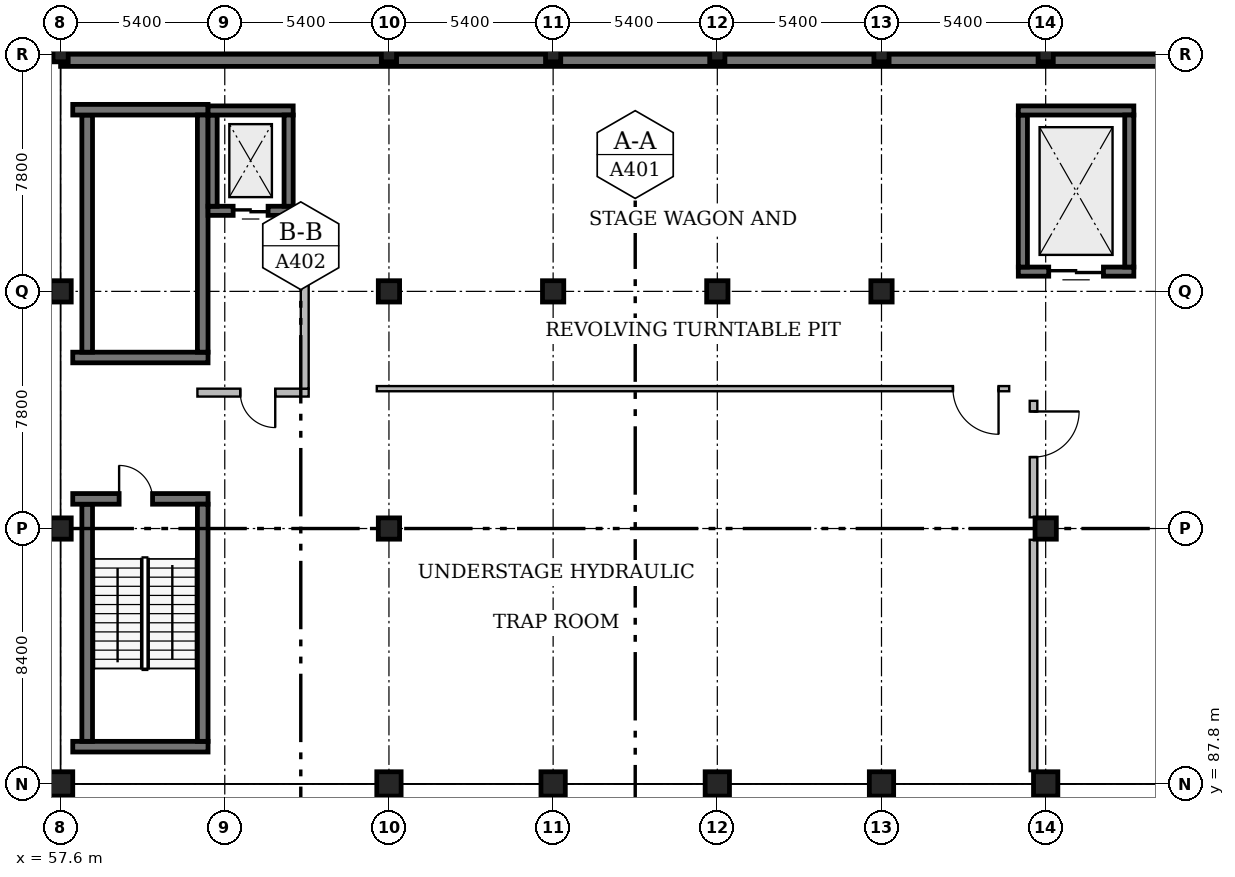
"""IFC4 building model, lengths in metres.
Left out: names, types, materials, properties, quantities, classifications, styles, units other than length and angle.
Written with IfcOpenShell. Run it as: python <this file> out.ifc"""

import sys

from ifc_helpers import new_model, si_unit, direction, frame, frame_2d, origin, origin_2d, place, context, subcontext, project, spatial, rectangle, extrude, element, fill, save


model = new_model("IFC4")
c1 = context("Model", 3, precision=1e-05, world=origin(), true_north=direction((0.0, 1.0)))
c2 = subcontext(c1, "Body", "Model", "MODEL_VIEW")
j1 = project(units=[si_unit("LENGTHUNIT", "METRE"), si_unit("PLANEANGLEUNIT", "RADIAN")], contexts=[c1])
p1 = place(None, origin())
s1 = spatial("IfcSite", under=j1, at=p1, CompositionType="ELEMENT")
p2 = place(p1, origin())
s2 = spatial("IfcBuilding", under=s1, at=p2, CompositionType="ELEMENT")
p3 = place(p2, frame((0.0, 0.0, -4.8)))
s3 = spatial("IfcBuildingStorey", under=s2, at=p3, CompositionType="ELEMENT", Elevation=-4.8)
p4 = place(p3, frame((68.4, 87.8, 0.0), z_axis=(0.0, 0.0, 1.0), x_axis=(1.0, 0.0, 0.0)))
e1 = element("IfcColumn", 1, at=p4, inside=s3, PredefinedType="COLUMN", context=c2, shape_type="SweptSolid", body=[
    extrude(rectangle(XDim=0.8, YDim=0.8, at=origin_2d()), origin(), (0.0, 0.0, 1.0), 4.8),
])
for number, where, z_axis, x_axis in (
    (2, (68.4, 96.2, 0.0), (0.0, 0.0, 1.0), (1.0, 0.0, 0.0)),
    (3, (68.4, 104.0, 0.0), (0.0, 0.0, 1.0), (1.0, 0.0, 0.0)),
):
    element("IfcColumn", number, at=place(p3, frame(where, z_axis=z_axis, x_axis=x_axis)), inside=s3, PredefinedType="COLUMN", context=c2, shape_type="SweptSolid", body=[
        extrude(rectangle(XDim=0.7, YDim=0.7, at=origin_2d()), origin(), (0.0, 0.0, 1.0), 4.8),
    ])
p5 = place(p3, frame((68.4, 111.8, 0.0), z_axis=(0.0, 0.0, 1.0), x_axis=(1.0, 0.0, 0.0)))
e4 = element("IfcColumn", 4, at=p5, inside=s3, PredefinedType="COLUMN", context=c2, shape_type="SweptSolid", body=[
    extrude(rectangle(XDim=0.5, YDim=0.5, at=origin_2d()), origin(), (0.0, 0.0, 1.0), 4.8),
])
p6 = place(p3, frame((73.8, 87.8, 0.0), z_axis=(0.0, 0.0, 1.0), x_axis=(1.0, 0.0, 0.0)))
e5 = element("IfcColumn", 5, at=p6, inside=s3, PredefinedType="COLUMN", context=c2, shape_type="SweptSolid", body=[
    extrude(rectangle(XDim=0.8, YDim=0.8, at=origin_2d()), origin(), (0.0, 0.0, 1.0), 4.8),
])
p7 = place(p3, frame((73.8, 104.0, 0.0), z_axis=(0.0, 0.0, 1.0), x_axis=(1.0, 0.0, 0.0)))
e6 = element("IfcColumn", 6, at=p7, inside=s3, PredefinedType="COLUMN", context=c2, shape_type="SweptSolid", body=[
    extrude(rectangle(XDim=0.7, YDim=0.7, at=origin_2d()), origin(), (0.0, 0.0, 1.0), 4.8),
])
p8 = place(p3, frame((73.8, 111.8, 0.0), z_axis=(0.0, 0.0, 1.0), x_axis=(1.0, 0.0, 0.0)))
e7 = element("IfcColumn", 7, at=p8, inside=s3, PredefinedType="COLUMN", context=c2, shape_type="SweptSolid", body=[
    extrude(rectangle(XDim=0.5, YDim=0.5, at=origin_2d()), origin(), (0.0, 0.0, 1.0), 4.8),
])
p9 = place(p3, frame((79.2, 87.8, 0.0), z_axis=(0.0, 0.0, 1.0), x_axis=(1.0, 0.0, 0.0)))
e8 = element("IfcColumn", 8, at=p9, inside=s3, PredefinedType="COLUMN", context=c2, shape_type="SweptSolid", body=[
    extrude(rectangle(XDim=0.8, YDim=0.8, at=origin_2d()), origin(), (0.0, 0.0, 1.0), 4.8),
])
p10 = place(p3, frame((79.2, 104.0, 0.0), z_axis=(0.0, 0.0, 1.0), x_axis=(1.0, 0.0, 0.0)))
e9 = element("IfcColumn", 9, at=p10, inside=s3, PredefinedType="COLUMN", context=c2, shape_type="SweptSolid", body=[
    extrude(rectangle(XDim=0.7, YDim=0.7, at=origin_2d()), origin(), (0.0, 0.0, 1.0), 4.8),
])
p11 = place(p3, frame((79.2, 111.8, 0.0), z_axis=(0.0, 0.0, 1.0), x_axis=(1.0, 0.0, 0.0)))
e10 = element("IfcColumn", 10, at=p11, inside=s3, PredefinedType="COLUMN", context=c2, shape_type="SweptSolid", body=[
    extrude(rectangle(XDim=0.5, YDim=0.5, at=origin_2d()), origin(), (0.0, 0.0, 1.0), 4.8),
])
p12 = place(p3, frame((84.6, 87.8, 0.0), z_axis=(0.0, 0.0, 1.0), x_axis=(1.0, 0.0, 0.0)))
e11 = element("IfcColumn", 11, at=p12, inside=s3, PredefinedType="COLUMN", context=c2, shape_type="SweptSolid", body=[
    extrude(rectangle(XDim=0.8, YDim=0.8, at=origin_2d()), origin(), (0.0, 0.0, 1.0), 4.8),
])
p13 = place(p3, frame((84.6, 104.0, 0.0), z_axis=(0.0, 0.0, 1.0), x_axis=(1.0, 0.0, 0.0)))
e12 = element("IfcColumn", 12, at=p13, inside=s3, PredefinedType="COLUMN", context=c2, shape_type="SweptSolid", body=[
    extrude(rectangle(XDim=0.7, YDim=0.7, at=origin_2d()), origin(), (0.0, 0.0, 1.0), 4.8),
])
p14 = place(p3, frame((84.6, 111.8, 0.0), z_axis=(0.0, 0.0, 1.0), x_axis=(1.0, 0.0, 0.0)))
e13 = element("IfcColumn", 13, at=p14, inside=s3, PredefinedType="COLUMN", context=c2, shape_type="SweptSolid", body=[
    extrude(rectangle(XDim=0.5, YDim=0.5, at=origin_2d()), origin(), (0.0, 0.0, 1.0), 4.8),
])
p15 = place(p3, frame((90.0, 87.8, 0.0), z_axis=(0.0, 0.0, 1.0), x_axis=(1.0, 0.0, 0.0)))
e14 = element("IfcColumn", 14, at=p15, inside=s3, PredefinedType="COLUMN", context=c2, shape_type="SweptSolid", body=[
    extrude(rectangle(XDim=0.8, YDim=0.8, at=origin_2d()), origin(), (0.0, 0.0, 1.0), 4.8),
])
p16 = place(p3, frame((90.0, 96.2, 0.0), z_axis=(0.0, 0.0, 1.0), x_axis=(1.0, 0.0, 0.0)))
e15 = element("IfcColumn", 15, at=p16, inside=s3, PredefinedType="COLUMN", context=c2, shape_type="SweptSolid", body=[
    extrude(rectangle(XDim=0.7, YDim=0.7, at=origin_2d()), origin(), (0.0, 0.0, 1.0), 4.8),
])
p17 = place(p3, frame((90.0, 111.8, 0.0), z_axis=(0.0, 0.0, 1.0), x_axis=(1.0, 0.0, 0.0)))
e16 = element("IfcColumn", 16, at=p17, inside=s3, PredefinedType="COLUMN", context=c2, shape_type="SweptSolid", body=[
    extrude(rectangle(XDim=0.5, YDim=0.5, at=origin_2d()), origin(), (0.0, 0.0, 1.0), 4.8),
])
p18 = place(p3, frame((57.6, 87.8, 0.0), z_axis=(0.0, 0.0, 1.0), x_axis=(1.0, 0.0, 0.0)))
e17 = element("IfcColumn", 17, at=p18, inside=s3, PredefinedType="COLUMN", context=c2, shape_type="SweptSolid", body=[
    extrude(rectangle(XDim=0.8, YDim=0.8, at=origin_2d()), origin(), (0.0, 0.0, 1.0), 4.8),
])
for number, where, z_axis, x_axis in (
    (18, (57.6, 96.2, 0.0), (0.0, 0.0, 1.0), (1.0, 0.0, 0.0)),
    (19, (57.6, 104.0, 0.0), (0.0, 0.0, 1.0), (1.0, 0.0, 0.0)),
):
    element("IfcColumn", number, at=place(p3, frame(where, z_axis=z_axis, x_axis=x_axis)), inside=s3, PredefinedType="COLUMN", context=c2, shape_type="SweptSolid", body=[
        extrude(rectangle(XDim=0.7, YDim=0.7, at=origin_2d()), origin(), (0.0, 0.0, 1.0), 4.8),
    ])
p19 = place(p3, frame((57.6, 111.8, 0.0), z_axis=(0.0, 0.0, 1.0), x_axis=(1.0, 0.0, 0.0)))
e20 = element("IfcColumn", 20, at=p19, inside=s3, PredefinedType="COLUMN", context=c2, shape_type="SweptSolid", body=[
    extrude(rectangle(XDim=0.5, YDim=0.5, at=origin_2d()), origin(), (0.0, 0.0, 1.0), 4.8),
])
p20 = place(p3, frame((62.45, 101.825, 0.0), z_axis=(0.0, 0.0, 1.0), x_axis=(-1.0, 0.0, 0.0)))
e21 = element("IfcWall", 21, at=p20, inside=s3, PredefinedType="SOLIDWALL", context=c2, shape_type="SweptSolid", body=[
    extrude(rectangle(XDim=4.45, YDim=0.35, at=frame_2d((2.225, 0.0))), origin(), (0.0, 0.0, 1.0), 4.48),
])
p21 = place(p3, frame((58.475, 102.0, 0.0), z_axis=(0.0, 0.0, 1.0), x_axis=(0.0, 1.0, 0.0)))
e22 = element("IfcWall", 22, at=p21, inside=s3, PredefinedType="SOLIDWALL", context=c2, shape_type="SweptSolid", body=[
    extrude(rectangle(XDim=7.8, YDim=0.35, at=frame_2d((3.9, 0.0))), origin(), (0.0, 0.0, 1.0), 4.48),
])
p22 = place(p3, frame((58.0, 109.975, 0.0), z_axis=(0.0, 0.0, 1.0), x_axis=(1.0, 0.0, 0.0)))
e23 = element("IfcWall", 23, at=p22, inside=s3, PredefinedType="SOLIDWALL", context=c2, shape_type="SweptSolid", body=[
    extrude(rectangle(XDim=4.45, YDim=0.35, at=frame_2d((2.225, 0.0))), origin(), (0.0, 0.0, 1.0), 4.48),
])
p23 = place(p3, frame((62.275, 109.8, 0.0), z_axis=(0.0, 0.0, 1.0), x_axis=(0.0, -1.0, 0.0)))
e24 = element("IfcWall", 24, at=p23, inside=s3, PredefinedType="SOLIDWALL", context=c2, shape_type="SweptSolid", body=[
    extrude(rectangle(XDim=7.8, YDim=0.35, at=frame_2d((3.9, 0.0))), origin(), (0.0, 0.0, 1.0), 4.48),
])
p24 = place(p3, frame((62.45, 89.025, 0.0), z_axis=(0.0, 0.0, 1.0), x_axis=(-1.0, 0.0, 0.0)))
e25 = element("IfcWall", 25, at=p24, inside=s3, PredefinedType="SOLIDWALL", context=c2, shape_type="SweptSolid", body=[
    extrude(rectangle(XDim=4.45, YDim=0.35, at=frame_2d((2.225, 0.0))), origin(), (0.0, 0.0, 1.0), 4.56),
])
p25 = place(p3, frame((58.475, 89.2, 0.0), z_axis=(0.0, 0.0, 1.0), x_axis=(0.0, 1.0, 0.0)))
e26 = element("IfcWall", 26, at=p25, inside=s3, PredefinedType="SOLIDWALL", context=c2, shape_type="SweptSolid", body=[
    extrude(rectangle(XDim=7.8, YDim=0.35, at=frame_2d((3.9, 0.0))), origin(), (0.0, 0.0, 1.0), 4.56),
])
p26 = place(p3, frame((58.0, 97.175, 0.0), z_axis=(0.0, 0.0, 1.0), x_axis=(1.0, 0.0, 0.0)))
e27 = element("IfcWall", 27, at=p26, inside=s3, PredefinedType="SOLIDWALL", context=c2, shape_type="SweptSolid", body=[
    extrude(rectangle(XDim=4.45, YDim=0.35, at=frame_2d((2.225, 0.0))), origin(), (0.0, 0.0, 1.0), 4.56),
])
p27 = place(p26, frame((1.525, 0.0, 0.0)))
e28 = element("IfcOpeningElement", 28, at=p27, cuts=e27, PredefinedType="OPENING", context=c2, shape_type="SweptSolid", body=[
    extrude(rectangle(XDim=1.1, YDim=2.15, at=frame_2d((0.55, 1.075))), frame((0.0, 0.195, 0.0), z_axis=(0.0, -1.0, 0.0), x_axis=(1.0, 0.0, 0.0)), (0.0, 0.0, 1.0), 0.39),
])
p28 = place(p3, frame((62.275, 97.0, 0.0), z_axis=(0.0, 0.0, 1.0), x_axis=(0.0, -1.0, 0.0)))
e29 = element("IfcWall", 29, at=p28, inside=s3, PredefinedType="SOLIDWALL", context=c2, shape_type="SweptSolid", body=[
    extrude(rectangle(XDim=7.8, YDim=0.35, at=frame_2d((3.9, 0.0))), origin(), (0.0, 0.0, 1.0), 4.56),
])
p29 = place(p3, frame((65.25, 106.65, 0.0), z_axis=(0.0, 0.0, 1.0), x_axis=(-1.0, 0.0, 0.0)))
e30 = element("IfcWall", 30, at=p29, inside=s3, PredefinedType="SOLIDWALL", context=c2, shape_type="SweptSolid", body=[
    extrude(rectangle(XDim=2.8, YDim=0.3, at=frame_2d((1.4, 0.0))), origin(), (0.0, 0.0, 1.0), 4.8),
])
p30 = place(p29, frame((0.825, 0.0, 0.0)))
e31 = element("IfcOpeningElement", 31, at=p30, cuts=e30, PredefinedType="OPENING", context=c2, shape_type="SweptSolid", body=[
    extrude(rectangle(XDim=1.15, YDim=2.1, at=frame_2d((0.575, 1.05))), frame((0.0, 0.17, 0.0), z_axis=(0.0, -1.0, 0.0), x_axis=(1.0, 0.0, 0.0)), (0.0, 0.0, 1.0), 0.34),
])
p31 = place(p3, frame((62.6, 106.8, 0.0), z_axis=(0.0, 0.0, 1.0), x_axis=(0.0, 1.0, 0.0)))
e32 = element("IfcWall", 32, at=p31, inside=s3, PredefinedType="SOLIDWALL", context=c2, shape_type="SweptSolid", body=[
    extrude(rectangle(XDim=3.0, YDim=0.3, at=frame_2d((1.5, 0.0))), origin(), (0.0, 0.0, 1.0), 4.8),
])
p32 = place(p3, frame((62.45, 109.95, 0.0), z_axis=(0.0, 0.0, 1.0), x_axis=(1.0, 0.0, 0.0)))
e33 = element("IfcWall", 33, at=p32, inside=s3, PredefinedType="SOLIDWALL", context=c2, shape_type="SweptSolid", body=[
    extrude(rectangle(XDim=2.8, YDim=0.3, at=frame_2d((1.4, 0.0))), origin(), (0.0, 0.0, 1.0), 4.8),
])
p33 = place(p3, frame((65.1, 109.8, 0.0), z_axis=(0.0, 0.0, 1.0), x_axis=(0.0, -1.0, 0.0)))
e34 = element("IfcWall", 34, at=p33, inside=s3, PredefinedType="SOLIDWALL", context=c2, shape_type="SweptSolid", body=[
    extrude(rectangle(XDim=3.0, YDim=0.3, at=frame_2d((1.5, 0.0))), origin(), (0.0, 0.0, 1.0), 4.8),
])
p34 = place(p3, frame((65.76, 100.67, 0.0), z_axis=(0.0, 0.0, 1.0), x_axis=(-1.0, 0.0, 0.0)))
e35 = element("IfcWall", 35, at=p34, inside=s3, PredefinedType="SOLIDWALL", context=c2, shape_type="SweptSolid", body=[
    extrude(rectangle(XDim=3.66, YDim=0.26, at=frame_2d((1.83, 0.0))), origin(), (0.0, 0.0, 1.0), 4.48),
])
p35 = place(p34, frame((1.1, 0.0, 0.0)))
e36 = element("IfcOpeningElement", 36, at=p35, cuts=e35, PredefinedType="OPENING", context=c2, shape_type="SweptSolid", body=[
    extrude(rectangle(XDim=1.15, YDim=2.2, at=frame_2d((0.575, 1.1))), frame((0.0, 0.15, 0.0), z_axis=(0.0, -1.0, 0.0), x_axis=(1.0, 0.0, 0.0)), (0.0, 0.0, 1.0), 0.3),
])
p36 = place(p3, frame((65.63, 106.65, 0.0), z_axis=(0.0, 0.0, 1.0), x_axis=(0.0, -1.0, 0.0)))
e37 = element("IfcWall", 37, at=p36, inside=s3, PredefinedType="SOLIDWALL", context=c2, shape_type="SweptSolid", body=[
    extrude(rectangle(XDim=5.85, YDim=0.26, at=frame_2d((2.925, 0.0))), origin(), (0.0, 0.0, 1.0), 4.48),
])
p37 = place(p3, frame((92.9, 104.65, 0.0), z_axis=(0.0, 0.0, 1.0), x_axis=(-1.0, 0.0, 0.0)))
e38 = element("IfcWall", 38, at=p37, inside=s3, PredefinedType="SOLIDWALL", context=c2, shape_type="SweptSolid", body=[
    extrude(rectangle(XDim=3.8, YDim=0.3, at=frame_2d((1.9, 0.0))), origin(), (0.0, 0.0, 1.0), 4.8),
])
p38 = place(p37, frame((1.0, 0.0, 0.0)))
e39 = element("IfcOpeningElement", 39, at=p38, cuts=e38, PredefinedType="OPENING", context=c2, shape_type="SweptSolid", body=[
    extrude(rectangle(XDim=1.8, YDim=2.4, at=frame_2d((0.9, 1.2))), frame((0.0, 0.17, 0.0), z_axis=(0.0, -1.0, 0.0), x_axis=(1.0, 0.0, 0.0)), (0.0, 0.0, 1.0), 0.34),
])
p39 = place(p3, frame((89.25, 104.8, 0.0), z_axis=(0.0, 0.0, 1.0), x_axis=(0.0, 1.0, 0.0)))
e40 = element("IfcWall", 40, at=p39, inside=s3, PredefinedType="SOLIDWALL", context=c2, shape_type="SweptSolid", body=[
    extrude(rectangle(XDim=5.0, YDim=0.3, at=frame_2d((2.5, 0.0))), origin(), (0.0, 0.0, 1.0), 4.8),
])
p40 = place(p3, frame((89.1, 109.95, 0.0), z_axis=(0.0, 0.0, 1.0), x_axis=(1.0, 0.0, 0.0)))
e41 = element("IfcWall", 41, at=p40, inside=s3, PredefinedType="SOLIDWALL", context=c2, shape_type="SweptSolid", body=[
    extrude(rectangle(XDim=3.8, YDim=0.3, at=frame_2d((1.9, 0.0))), origin(), (0.0, 0.0, 1.0), 4.8),
])
p41 = place(p3, frame((92.75, 109.8, 0.0), z_axis=(0.0, 0.0, 1.0), x_axis=(0.0, -1.0, 0.0)))
e42 = element("IfcWall", 42, at=p41, inside=s3, PredefinedType="SOLIDWALL", context=c2, shape_type="SweptSolid", body=[
    extrude(rectangle(XDim=5.0, YDim=0.3, at=frame_2d((2.5, 0.0))), origin(), (0.0, 0.0, 1.0), 4.8),
])
p42 = place(p3, frame((57.6, 111.6, 0.0), z_axis=(0.0, 0.0, 1.0), x_axis=(1.0, 0.0, 0.0)))
e43 = element("IfcWall", 43, at=p42, inside=s3, PredefinedType="SOLIDWALL", context=c2, shape_type="SweptSolid", body=[
    extrude(rectangle(XDim=93.0, YDim=0.4, at=frame_2d((46.5, 0.0))), origin(), (0.0, 0.0, 1.0), 4.48),
])
p43 = place(p3, frame((89.6, 100.4, 0.0), z_axis=(0.0, 0.0, 1.0), x_axis=(0.0, -1.0, 0.0)))
e44 = element("IfcWall", 44, at=p43, inside=s3, PredefinedType="PARTITIONING", context=c2, shape_type="SweptSolid", body=[
    extrude(rectangle(XDim=3.83, YDim=0.25, at=frame_2d((1.915, 0.0))), origin(), (0.0, 0.0, 1.0), 4.48),
])
p44 = place(p43, frame((0.35, 0.0, 0.0)))
e45 = element("IfcOpeningElement", 45, at=p44, cuts=e44, PredefinedType="OPENING", context=c2, shape_type="SweptSolid", body=[
    extrude(rectangle(XDim=1.5, YDim=2.2, at=frame_2d((0.75, 1.1))), frame((0.0, 0.145, 0.0), z_axis=(0.0, -1.0, 0.0), x_axis=(1.0, 0.0, 0.0)), (0.0, 0.0, 1.0), 0.29),
])
p45 = place(p3, frame((89.6, 95.83, 0.0), z_axis=(0.0, 0.0, 1.0), x_axis=(0.0, -1.0, 0.0)))
e46 = element("IfcWall", 46, at=p45, inside=s3, PredefinedType="PARTITIONING", context=c2, shape_type="SweptSolid", body=[
    extrude(rectangle(XDim=7.61, YDim=0.25, at=frame_2d((3.805, 0.0))), origin(), (0.0, 0.0, 1.0), 3.6),
])
p46 = place(p3, frame((88.8, 100.8, 0.0), z_axis=(0.0, 0.0, 1.0), x_axis=(-1.0, 0.0, 0.0)))
e47 = element("IfcWall", 47, at=p46, inside=s3, PredefinedType="PARTITIONING", context=c2, shape_type="SweptSolid", body=[
    extrude(rectangle(XDim=20.8, YDim=0.17, at=frame_2d((10.4, 0.0))), origin(), (0.0, 0.0, 1.0), 4.48),
])
p47 = place(p46, frame((0.35, 0.0, 0.0)))
e48 = element("IfcOpeningElement", 48, at=p47, cuts=e47, PredefinedType="OPENING", context=c2, shape_type="SweptSolid", body=[
    extrude(rectangle(XDim=1.5, YDim=2.2, at=frame_2d((0.75, 1.1))), frame((0.0, 0.105, 0.0), z_axis=(0.0, -1.0, 0.0), x_axis=(1.0, 0.0, 0.0)), (0.0, 0.0, 1.0), 0.21),
])
p48 = place(p27, origin())
e49 = element("IfcDoor", 49, at=p48, inside=s3, OperationType="SINGLE_SWING_LEFT", PredefinedType="DOOR", context=c2, shape_type="SweptSolid", body=[
    extrude(rectangle(XDim=1.1, YDim=2.15, at=frame_2d((0.55, 1.075))), frame((0.0, 0.025, 0.0), z_axis=(0.0, -1.0, 0.0), x_axis=(1.0, 0.0, 0.0)), (0.0, 0.0, 1.0), 0.05),
])
fill(e28, e49)
p49 = place(p30, origin())
e50 = element("IfcDoor", 50, at=p49, inside=s3, OperationType="DOUBLE_DOOR_SLIDING", PredefinedType="DOOR", context=c2, shape_type="SweptSolid", body=[
    extrude(rectangle(XDim=1.15, YDim=2.1, at=frame_2d((0.575, 1.05))), frame((0.0, 0.025, 0.0), z_axis=(0.0, -1.0, 0.0), x_axis=(1.0, 0.0, 0.0)), (0.0, 0.0, 1.0), 0.05),
])
fill(e31, e50)
p50 = place(p35, origin())
e51 = element("IfcDoor", 51, at=p50, inside=s3, OperationType="SINGLE_SWING_LEFT", PredefinedType="DOOR", context=c2, shape_type="SweptSolid", body=[
    extrude(rectangle(XDim=1.15, YDim=2.2, at=frame_2d((0.575, 1.1))), frame((0.0, 0.025, 0.0), z_axis=(0.0, -1.0, 0.0), x_axis=(1.0, 0.0, 0.0)), (0.0, 0.0, 1.0), 0.05),
])
fill(e36, e51)
p51 = place(p38, origin())
e52 = element("IfcDoor", 52, at=p51, inside=s3, OperationType="DOUBLE_DOOR_SLIDING", PredefinedType="DOOR", context=c2, shape_type="SweptSolid", body=[
    extrude(rectangle(XDim=1.8, YDim=2.4, at=frame_2d((0.9, 1.2))), frame((0.0, 0.025, 0.0), z_axis=(0.0, -1.0, 0.0), x_axis=(1.0, 0.0, 0.0)), (0.0, 0.0, 1.0), 0.05),
])
fill(e39, e52)
p52 = place(p44, origin())
e53 = element("IfcDoor", 53, at=p52, inside=s3, OperationType="DOUBLE_DOOR_SINGLE_SWING", PredefinedType="DOOR", context=c2, shape_type="SweptSolid", body=[
    extrude(rectangle(XDim=1.5, YDim=2.2, at=frame_2d((0.75, 1.1))), frame((0.0, 0.025, 0.0), z_axis=(0.0, -1.0, 0.0), x_axis=(1.0, 0.0, 0.0)), (0.0, 0.0, 1.0), 0.05),
])
fill(e45, e53)
p53 = place(p47, origin())
e54 = element("IfcDoor", 54, at=p53, inside=s3, OperationType="DOUBLE_DOOR_SINGLE_SWING", PredefinedType="DOOR", context=c2, shape_type="SweptSolid", body=[
    extrude(rectangle(XDim=1.5, YDim=2.2, at=frame_2d((0.75, 1.1))), frame((0.0, 0.025, 0.0), z_axis=(0.0, -1.0, 0.0), x_axis=(1.0, 0.0, 0.0)), (0.0, 0.0, 1.0), 0.05),
])
fill(e48, e54)
save(model, sys.argv[1])
